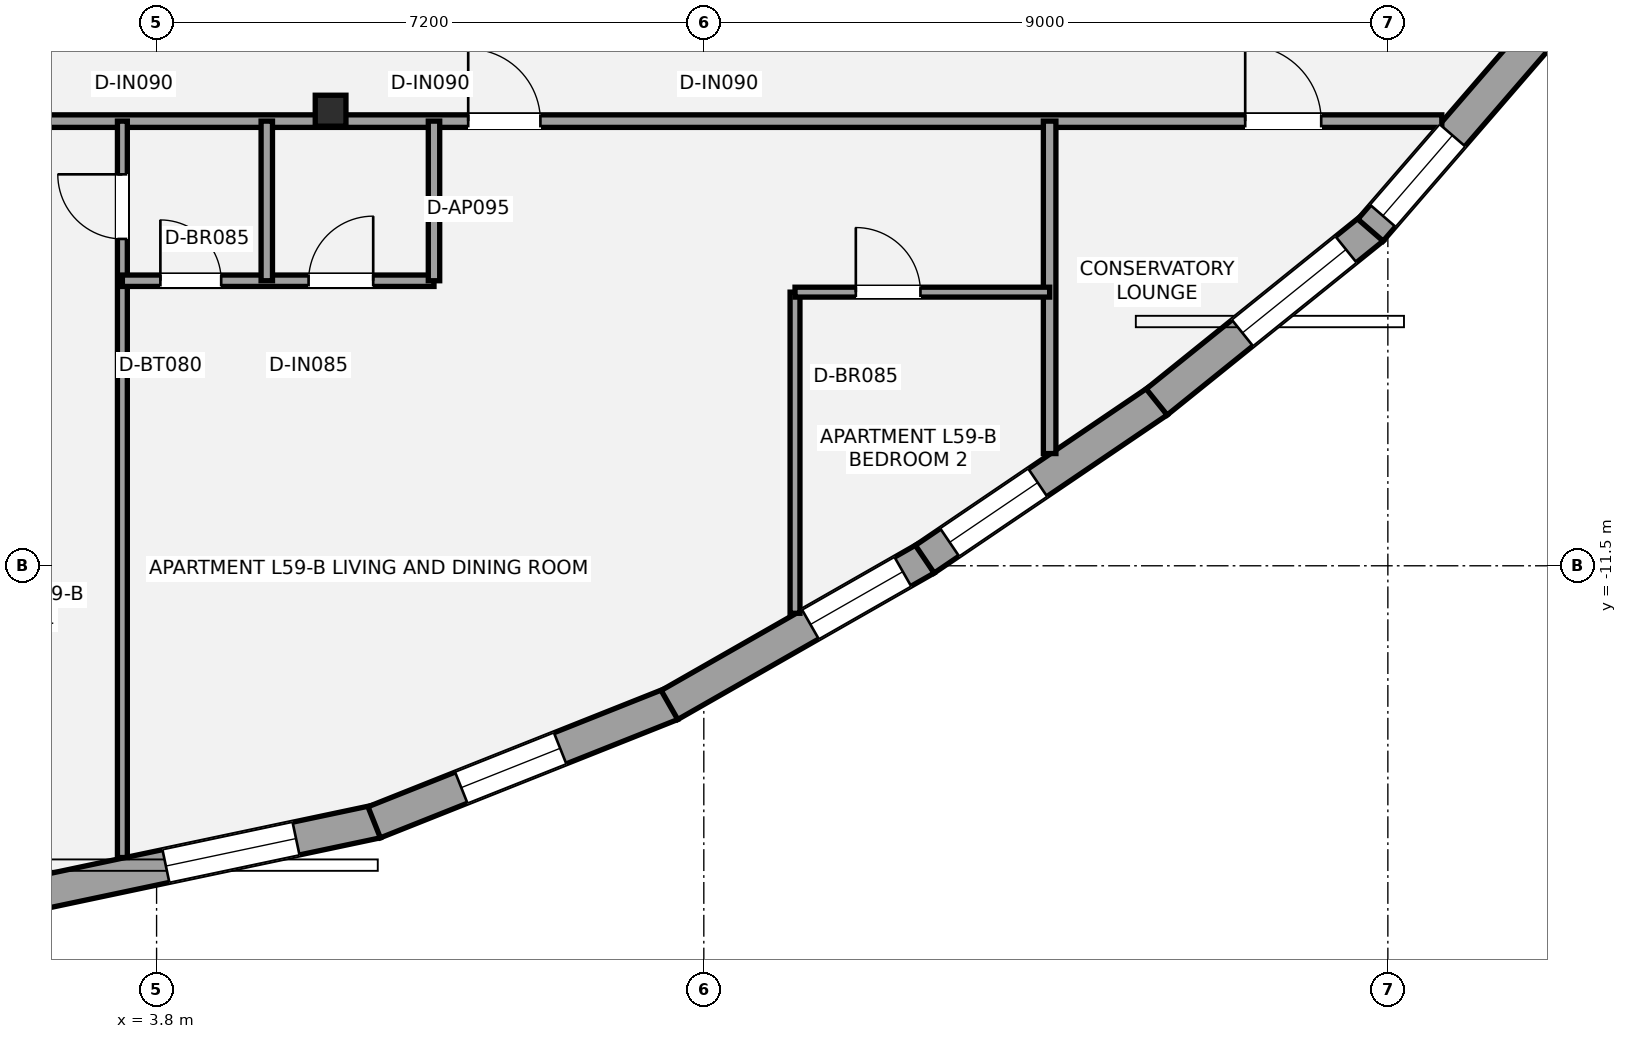
"""IFC4 building model, lengths in metres.
Left out: names, types, materials, properties, quantities, classifications, styles, units other than length and angle.
Written with IfcOpenShell. Run it as: python <this file> out.ifc"""

import sys

from ifc_helpers import new_model, si_unit, direction, frame, frame_2d, origin, origin_2d, place, context, subcontext, project, spatial, rectangle, i_section, extrude, element, fill, save


model = new_model("IFC4")
c1 = context("Model", 3, precision=1e-05, world=origin(), true_north=direction((0.0, 1.0)))
c2 = subcontext(c1, "Body", "Model", "MODEL_VIEW")
j1 = project(units=[si_unit("LENGTHUNIT", "METRE"), si_unit("PLANEANGLEUNIT", "RADIAN")], contexts=[c1])
p1 = place(None, origin())
s1 = spatial("IfcSite", under=j1, at=p1, CompositionType="ELEMENT")
p2 = place(p1, origin())
s2 = spatial("IfcBuilding", under=s1, at=p2, CompositionType="ELEMENT")
p3 = place(p2, frame((0.0, 0.0, 213.15)))
s3 = spatial("IfcBuildingStorey", under=s2, at=p3, CompositionType="ELEMENT", Elevation=213.15)
p4 = place(p3, frame((6.09, -5.513, 0.0), z_axis=(0.0, 0.0, 1.0), x_axis=(1.0, 0.0, 0.0)))
e1 = element("IfcColumn", 1, at=p4, inside=s3, PredefinedType="COLUMN", context=c2, shape_type="SweptSolid", body=[
    extrude(i_section(OverallWidth=0.404, OverallDepth=0.407, WebThickness=0.027, FlangeThickness=0.044, at=origin_2d()), origin(), (0.0, 0.0, 1.0), 3.15),
])
p5 = place(p3, frame((6.699, -14.864, 0.0), z_axis=(0.0, 0.0, 1.0), x_axis=(-0.97840271225, -0.206707843737, 0.0)))
e2 = element("IfcWall", 2, at=p5, inside=s3, PredefinedType="STANDARD", context=c2, shape_type="SweptSolid", body=[
    extrude(rectangle(XDim=4.517, YDim=0.44, at=frame_2d((2.258, 0.0))), origin(), (0.0, 0.0, 1.0), 2.336),
])
p6 = place(p5, frame((1.087, 0.0, 0.55)))
e3 = element("IfcOpeningElement", 3, at=p6, cuts=e2, PredefinedType="OPENING", context=c2, shape_type="SweptSolid", body=[
    extrude(rectangle(XDim=1.75, YDim=1.55, at=frame_2d((0.875, 0.775))), frame((0.0, 0.23, 0.0), z_axis=(0.0, -1.0, 0.0), x_axis=(1.0, 0.0, 0.0)), (0.0, 0.0, 1.0), 0.46),
])
p7 = place(p3, frame((10.576, -13.318, 0.0), z_axis=(0.0, 0.0, 1.0), x_axis=(-0.929170765931, -0.369650764558, 0.0)))
e4 = element("IfcWall", 4, at=p7, inside=s3, PredefinedType="STANDARD", context=c2, shape_type="SweptSolid", body=[
    extrude(rectangle(XDim=4.211, YDim=0.44, at=frame_2d((2.105, 0.0))), origin(), (0.0, 0.0, 1.0), 2.336),
])
p8 = place(p7, frame((1.578, 0.0, 0.55)))
e5 = element("IfcOpeningElement", 5, at=p8, cuts=e4, PredefinedType="OPENING", context=c2, shape_type="SweptSolid", body=[
    extrude(rectangle(XDim=1.4, YDim=1.55, at=frame_2d((0.7, 0.775))), frame((0.0, 0.23, 0.0), z_axis=(0.0, -1.0, 0.0), x_axis=(1.0, 0.0, 0.0)), (0.0, 0.0, 1.0), 0.46),
])
p9 = place(p3, frame((13.922, -11.405, 0.0), z_axis=(0.0, 0.0, 1.0), x_axis=(-0.868339797426, -0.495969753317, 0.0)))
e6 = element("IfcWall", 6, at=p9, inside=s3, PredefinedType="STANDARD", context=c2, shape_type="SweptSolid", body=[
    extrude(rectangle(XDim=3.885, YDim=0.44, at=frame_2d((1.943, 0.0))), origin(), (0.0, 0.0, 1.0), 2.336),
])
p10 = place(p9, frame((0.349, 0.0, 0.58)))
e7 = element("IfcOpeningElement", 7, at=p10, cuts=e6, PredefinedType="OPENING", context=c2, shape_type="SweptSolid", body=[
    extrude(rectangle(XDim=1.4, YDim=1.55, at=frame_2d((0.7, 0.775))), frame((0.0, 0.23, 0.0), z_axis=(0.0, -1.0, 0.0), x_axis=(1.0, 0.0, 0.0)), (0.0, 0.0, 1.0), 0.46),
])
p11 = place(p3, frame((16.973, -9.334, 0.0), z_axis=(0.0, 0.0, 1.0), x_axis=(-0.827592777121, -0.561328954586, 0.0)))
e8 = element("IfcWall", 8, at=p11, inside=s3, PredefinedType="STANDARD", context=c2, shape_type="SweptSolid", body=[
    extrude(rectangle(XDim=3.704, YDim=0.44, at=frame_2d((1.852, 0.0))), origin(), (0.0, 0.0, 1.0), 2.336),
])
p12 = place(p11, frame((1.909, 0.0, 0.58)))
e9 = element("IfcOpeningElement", 9, at=p12, cuts=e8, PredefinedType="OPENING", context=c2, shape_type="SweptSolid", body=[
    extrude(rectangle(XDim=1.4, YDim=1.55, at=frame_2d((0.7, 0.775))), frame((0.0, 0.23, 0.0), z_axis=(0.0, -1.0, 0.0), x_axis=(1.0, 0.0, 0.0)), (0.0, 0.0, 1.0), 0.46),
])
p13 = place(p3, frame((19.8, -7.057, 0.0), z_axis=(0.0, 0.0, 1.0), x_axis=(-0.778794775864, -0.627278803314, 0.0)))
e10 = element("IfcWall", 10, at=p13, inside=s3, PredefinedType="STANDARD", context=c2, shape_type="SweptSolid", body=[
    extrude(rectangle(XDim=3.648, YDim=0.44, at=frame_2d((1.824, 0.0))), origin(), (0.0, 0.0, 1.0), 2.336),
])
p14 = place(p13, frame((0.45, 0.0, 0.55)))
e11 = element("IfcOpeningElement", 11, at=p14, cuts=e10, PredefinedType="OPENING", context=c2, shape_type="SweptSolid", body=[
    extrude(rectangle(XDim=1.75, YDim=1.55, at=frame_2d((0.875, 0.775))), frame((0.0, 0.23, 0.0), z_axis=(0.0, -1.0, 0.0), x_axis=(1.0, 0.0, 0.0)), (0.0, 0.0, 1.0), 0.46),
])
p15 = place(p3, frame((22.066, -4.43, 0.0), z_axis=(0.0, 0.0, 1.0), x_axis=(-0.654143325051, -0.75637061702, 0.0)))
e12 = element("IfcWall", 12, at=p15, inside=s3, PredefinedType="STANDARD", context=c2, shape_type="SweptSolid", body=[
    extrude(rectangle(XDim=3.508, YDim=0.44, at=frame_2d((1.754, 0.0))), origin(), (0.0, 0.0, 1.0), 2.336),
])
p16 = place(p15, frame((1.86, 0.0, 0.58)))
e13 = element("IfcOpeningElement", 13, at=p16, cuts=e12, PredefinedType="OPENING", context=c2, shape_type="SweptSolid", body=[
    extrude(rectangle(XDim=1.4, YDim=1.55, at=frame_2d((0.7, 0.775))), frame((0.0, 0.23, 0.0), z_axis=(0.0, -1.0, 0.0), x_axis=(1.0, 0.0, 0.0)), (0.0, 0.0, 1.0), 0.46),
])
p17 = place(p3, frame((-20.71, -5.65, 0.0), z_axis=(0.0, 0.0, 1.0), x_axis=(1.0, 0.0, 0.0)))
e14 = element("IfcWall", 14, at=p17, inside=s3, PredefinedType="PARTITIONING", context=c2, shape_type="SweptSolid", body=[
    extrude(rectangle(XDim=41.42, YDim=0.165, at=frame_2d((20.71, 0.0))), origin(), (0.0, 0.0, 1.0), 2.357),
])
p18 = place(p17, frame((1.587, 0.0, 0.0)))
e15 = element("IfcOpeningElement", 15, at=p18, cuts=e14, PredefinedType="OPENING", context=c2, shape_type="SweptSolid", body=[
    extrude(rectangle(XDim=1.0, YDim=2.15, at=frame_2d((0.5, 1.075))), frame((0.0, 0.093, 0.0), z_axis=(0.0, -1.0, 0.0), x_axis=(1.0, 0.0, 0.0)), (0.0, 0.0, 1.0), 0.185),
])
p19 = place(p17, frame((38.833, 0.0, 0.0)))
e16 = element("IfcOpeningElement", 16, at=p19, cuts=e14, PredefinedType="OPENING", context=c2, shape_type="SweptSolid", body=[
    extrude(rectangle(XDim=1.0, YDim=2.15, at=frame_2d((0.5, 1.075))), frame((0.0, 0.093, 0.0), z_axis=(0.0, -1.0, 0.0), x_axis=(1.0, 0.0, 0.0)), (0.0, 0.0, 1.0), 0.185),
])
p20 = place(p17, frame((15.02, 0.0, 0.0)))
e17 = element("IfcOpeningElement", 17, at=p20, cuts=e14, PredefinedType="OPENING", context=c2, shape_type="SweptSolid", body=[
    extrude(rectangle(XDim=0.95, YDim=2.15, at=frame_2d((0.475, 1.075))), frame((0.0, 0.093, 0.0), z_axis=(0.0, -1.0, 0.0), x_axis=(1.0, 0.0, 0.0)), (0.0, 0.0, 1.0), 0.185),
])
p21 = place(p17, frame((28.61, 0.0, 0.0)))
e18 = element("IfcOpeningElement", 18, at=p21, cuts=e14, PredefinedType="OPENING", context=c2, shape_type="SweptSolid", body=[
    extrude(rectangle(XDim=0.95, YDim=2.15, at=frame_2d((0.475, 1.075))), frame((0.0, 0.093, 0.0), z_axis=(0.0, -1.0, 0.0), x_axis=(1.0, 0.0, 0.0)), (0.0, 0.0, 1.0), 0.185),
])
p22 = place(p3, frame((15.55, -10.024, 0.0), z_axis=(0.0, 0.0, 1.0), x_axis=(0.0, 1.0, 0.0)))
e19 = element("IfcWall", 19, at=p22, inside=s3, PredefinedType="PARTITIONING", context=c2, shape_type="SweptSolid", body=[
    extrude(rectangle(XDim=4.374, YDim=0.165, at=frame_2d((2.187, 0.0))), origin(), (0.0, 0.0, 1.0), 2.97),
])
p23 = place(p3, frame((3.35, -15.338, 0.0), z_axis=(0.0, 0.0, 1.0), x_axis=(0.0, 1.0, 0.0)))
e20 = element("IfcWall", 20, at=p23, inside=s3, PredefinedType="PARTITIONING", context=c2, shape_type="SweptSolid", body=[
    extrude(rectangle(XDim=9.688, YDim=0.13, at=frame_2d((4.844, 0.0))), origin(), (0.0, 0.0, 1.0), 2.423),
])
p24 = place(p23, frame((8.138, 0.0, 0.0)))
e21 = element("IfcOpeningElement", 21, at=p24, cuts=e20, PredefinedType="OPENING", context=c2, shape_type="SweptSolid", body=[
    extrude(rectangle(XDim=0.85, YDim=2.1, at=frame_2d((0.425, 1.05))), frame((0.0, 0.075, 0.0), z_axis=(0.0, -1.0, 0.0), x_axis=(1.0, 0.0, 0.0)), (0.0, 0.0, 1.0), 0.15),
])
p25 = place(p3, frame((3.35, -7.75, 0.0), z_axis=(0.0, 0.0, 1.0), x_axis=(1.0, 0.0, 0.0)))
e22 = element("IfcWall", 22, at=p25, inside=s3, PredefinedType="PLUMBINGWALL", context=c2, shape_type="SweptSolid", body=[
    extrude(rectangle(XDim=4.1, YDim=0.15, at=frame_2d((2.05, 0.0))), origin(), (0.0, 0.0, 1.0), 2.97),
])
p26 = place(p25, frame((0.5, 0.0, 0.0)))
e23 = element("IfcOpeningElement", 23, at=p26, cuts=e22, PredefinedType="OPENING", context=c2, shape_type="SweptSolid", body=[
    extrude(rectangle(XDim=0.8, YDim=2.1, at=frame_2d((0.4, 1.05))), frame((0.0, 0.085, 0.0), z_axis=(0.0, -1.0, 0.0), x_axis=(1.0, 0.0, 0.0)), (0.0, 0.0, 1.0), 0.17),
])
p27 = place(p25, frame((2.45, 0.0, 0.0)))
e24 = element("IfcOpeningElement", 24, at=p27, cuts=e22, PredefinedType="OPENING", context=c2, shape_type="SweptSolid", body=[
    extrude(rectangle(XDim=0.85, YDim=2.1, at=frame_2d((0.425, 1.05))), frame((0.0, 0.085, 0.0), z_axis=(0.0, -1.0, 0.0), x_axis=(1.0, 0.0, 0.0)), (0.0, 0.0, 1.0), 0.17),
])
for number, where, z_axis, x_axis in (
    (25, (5.25, -7.75, 0.0), (0.0, 0.0, 1.0), (0.0, 1.0, 0.0)),
    (26, (7.45, -7.75, 0.0), (0.0, 0.0, 1.0), (0.0, 1.0, 0.0)),
):
    element("IfcWall", number, at=place(p3, frame(where, z_axis=z_axis, x_axis=x_axis)), inside=s3, PredefinedType="PLUMBINGWALL", context=c2, shape_type="SweptSolid", body=[
        extrude(rectangle(XDim=2.1, YDim=0.15, at=frame_2d((1.05, 0.0))), origin(), (0.0, 0.0, 1.0), 2.97),
    ])
p28 = place(p3, frame((12.2, -12.125, 0.0), z_axis=(0.0, 0.0, 1.0), x_axis=(0.0, 1.0, 0.0)))
e27 = element("IfcWall", 27, at=p28, inside=s3, PredefinedType="PARTITIONING", context=c2, shape_type="SweptSolid", body=[
    extrude(rectangle(XDim=4.225, YDim=0.13, at=frame_2d((2.113, 0.0))), origin(), (0.0, 0.0, 1.0), 2.423),
])
p29 = place(p3, frame((12.2, -7.9, 0.0), z_axis=(0.0, 0.0, 1.0), x_axis=(1.0, 0.0, 0.0)))
e28 = element("IfcWall", 28, at=p29, inside=s3, PredefinedType="PARTITIONING", context=c2, shape_type="SweptSolid", body=[
    extrude(rectangle(XDim=3.35, YDim=0.13, at=frame_2d((1.675, 0.0))), origin(), (0.0, 0.0, 1.0), 2.423),
])
p30 = place(p29, frame((0.8, 0.0, 0.0)))
e29 = element("IfcOpeningElement", 29, at=p30, cuts=e28, PredefinedType="OPENING", context=c2, shape_type="SweptSolid", body=[
    extrude(rectangle(XDim=0.85, YDim=2.1, at=frame_2d((0.425, 1.05))), frame((0.0, 0.075, 0.0), z_axis=(0.0, -1.0, 0.0), x_axis=(1.0, 0.0, 0.0)), (0.0, 0.0, 1.0), 0.15),
])
p31 = place(p6, origin())
e30 = element("IfcWindow", 30, at=p31, inside=s3, PartitioningType="SINGLE_PANEL", PredefinedType="WINDOW", context=c2, shape_type="SweptSolid", body=[
    extrude(rectangle(XDim=1.75, YDim=1.55, at=frame_2d((0.875, 0.775))), frame((0.0, -0.01, 0.0), z_axis=(0.0, -1.0, 0.0), x_axis=(1.0, 0.0, 0.0)), (0.0, 0.0, 1.0), 0.06),
])
fill(e3, e30)
p32 = place(p8, origin())
e31 = element("IfcWindow", 31, at=p32, inside=s3, PartitioningType="SINGLE_PANEL", PredefinedType="WINDOW", context=c2, shape_type="SweptSolid", body=[
    extrude(rectangle(XDim=1.4, YDim=1.55, at=frame_2d((0.7, 0.775))), frame((0.0, -0.01, 0.0), z_axis=(0.0, -1.0, 0.0), x_axis=(1.0, 0.0, 0.0)), (0.0, 0.0, 1.0), 0.06),
])
fill(e5, e31)
p33 = place(p10, origin())
e32 = element("IfcWindow", 32, at=p33, inside=s3, PartitioningType="SINGLE_PANEL", PredefinedType="WINDOW", context=c2, shape_type="SweptSolid", body=[
    extrude(rectangle(XDim=1.4, YDim=1.55, at=frame_2d((0.7, 0.775))), frame((0.0, -0.01, 0.0), z_axis=(0.0, -1.0, 0.0), x_axis=(1.0, 0.0, 0.0)), (0.0, 0.0, 1.0), 0.06),
])
fill(e7, e32)
p34 = place(p12, origin())
e33 = element("IfcWindow", 33, at=p34, inside=s3, PartitioningType="SINGLE_PANEL", PredefinedType="WINDOW", context=c2, shape_type="SweptSolid", body=[
    extrude(rectangle(XDim=1.4, YDim=1.55, at=frame_2d((0.7, 0.775))), frame((0.0, -0.01, 0.0), z_axis=(0.0, -1.0, 0.0), x_axis=(1.0, 0.0, 0.0)), (0.0, 0.0, 1.0), 0.06),
])
fill(e9, e33)
p35 = place(p14, origin())
e34 = element("IfcWindow", 34, at=p35, inside=s3, PartitioningType="SINGLE_PANEL", PredefinedType="WINDOW", context=c2, shape_type="SweptSolid", body=[
    extrude(rectangle(XDim=1.75, YDim=1.55, at=frame_2d((0.875, 0.775))), frame((0.0, -0.01, 0.0), z_axis=(0.0, -1.0, 0.0), x_axis=(1.0, 0.0, 0.0)), (0.0, 0.0, 1.0), 0.06),
])
fill(e11, e34)
p36 = place(p16, origin())
e35 = element("IfcWindow", 35, at=p36, inside=s3, PartitioningType="SINGLE_PANEL", PredefinedType="WINDOW", context=c2, shape_type="SweptSolid", body=[
    extrude(rectangle(XDim=1.4, YDim=1.55, at=frame_2d((0.7, 0.775))), frame((0.0, -0.01, 0.0), z_axis=(0.0, -1.0, 0.0), x_axis=(1.0, 0.0, 0.0)), (0.0, 0.0, 1.0), 0.06),
])
fill(e13, e35)
p37 = place(p19, origin())
e36 = element("IfcDoor", 36, at=p37, inside=s3, OperationType="SINGLE_SWING_LEFT", PredefinedType="DOOR", context=c2, shape_type="SweptSolid", body=[
    extrude(rectangle(XDim=1.0, YDim=2.15, at=frame_2d((0.5, 1.075))), frame((0.0, 0.025, 0.0), z_axis=(0.0, -1.0, 0.0), x_axis=(1.0, 0.0, 0.0)), (0.0, 0.0, 1.0), 0.05),
])
fill(e16, e36)
p38 = place(p24, origin())
e37 = element("IfcDoor", 37, at=p38, inside=s3, OperationType="SINGLE_SWING_RIGHT", PredefinedType="DOOR", context=c2, shape_type="SweptSolid", body=[
    extrude(rectangle(XDim=0.85, YDim=2.1, at=frame_2d((0.425, 1.05))), frame((0.0, 0.025, 0.0), z_axis=(0.0, -1.0, 0.0), x_axis=(1.0, 0.0, 0.0)), (0.0, 0.0, 1.0), 0.05),
])
fill(e21, e37)
p39 = place(p26, origin())
e38 = element("IfcDoor", 38, at=p39, inside=s3, OperationType="SINGLE_SWING_LEFT", PredefinedType="DOOR", context=c2, shape_type="SweptSolid", body=[
    extrude(rectangle(XDim=0.8, YDim=2.1, at=frame_2d((0.4, 1.05))), frame((0.0, 0.025, 0.0), z_axis=(0.0, -1.0, 0.0), x_axis=(1.0, 0.0, 0.0)), (0.0, 0.0, 1.0), 0.05),
])
fill(e23, e38)
p40 = place(p27, origin())
e39 = element("IfcDoor", 39, at=p40, inside=s3, OperationType="SINGLE_SWING_RIGHT", PredefinedType="DOOR", context=c2, shape_type="SweptSolid", body=[
    extrude(rectangle(XDim=0.85, YDim=2.1, at=frame_2d((0.425, 1.05))), frame((0.0, 0.025, 0.0), z_axis=(0.0, -1.0, 0.0), x_axis=(1.0, 0.0, 0.0)), (0.0, 0.0, 1.0), 0.05),
])
fill(e24, e39)
p41 = place(p21, origin())
e40 = element("IfcDoor", 40, at=p41, inside=s3, OperationType="SINGLE_SWING_LEFT", PredefinedType="DOOR", context=c2, shape_type="SweptSolid", body=[
    extrude(rectangle(XDim=0.95, YDim=2.15, at=frame_2d((0.475, 1.075))), frame((0.0, 0.025, 0.0), z_axis=(0.0, -1.0, 0.0), x_axis=(1.0, 0.0, 0.0)), (0.0, 0.0, 1.0), 0.05),
])
fill(e18, e40)
p42 = place(p30, origin())
e41 = element("IfcDoor", 41, at=p42, inside=s3, OperationType="SINGLE_SWING_LEFT", PredefinedType="DOOR", context=c2, shape_type="SweptSolid", body=[
    extrude(rectangle(XDim=0.85, YDim=2.1, at=frame_2d((0.425, 1.05))), frame((0.0, 0.025, 0.0), z_axis=(0.0, -1.0, 0.0), x_axis=(1.0, 0.0, 0.0)), (0.0, 0.0, 1.0), 0.05),
])
fill(e29, e41)
save(model, sys.argv[1])
